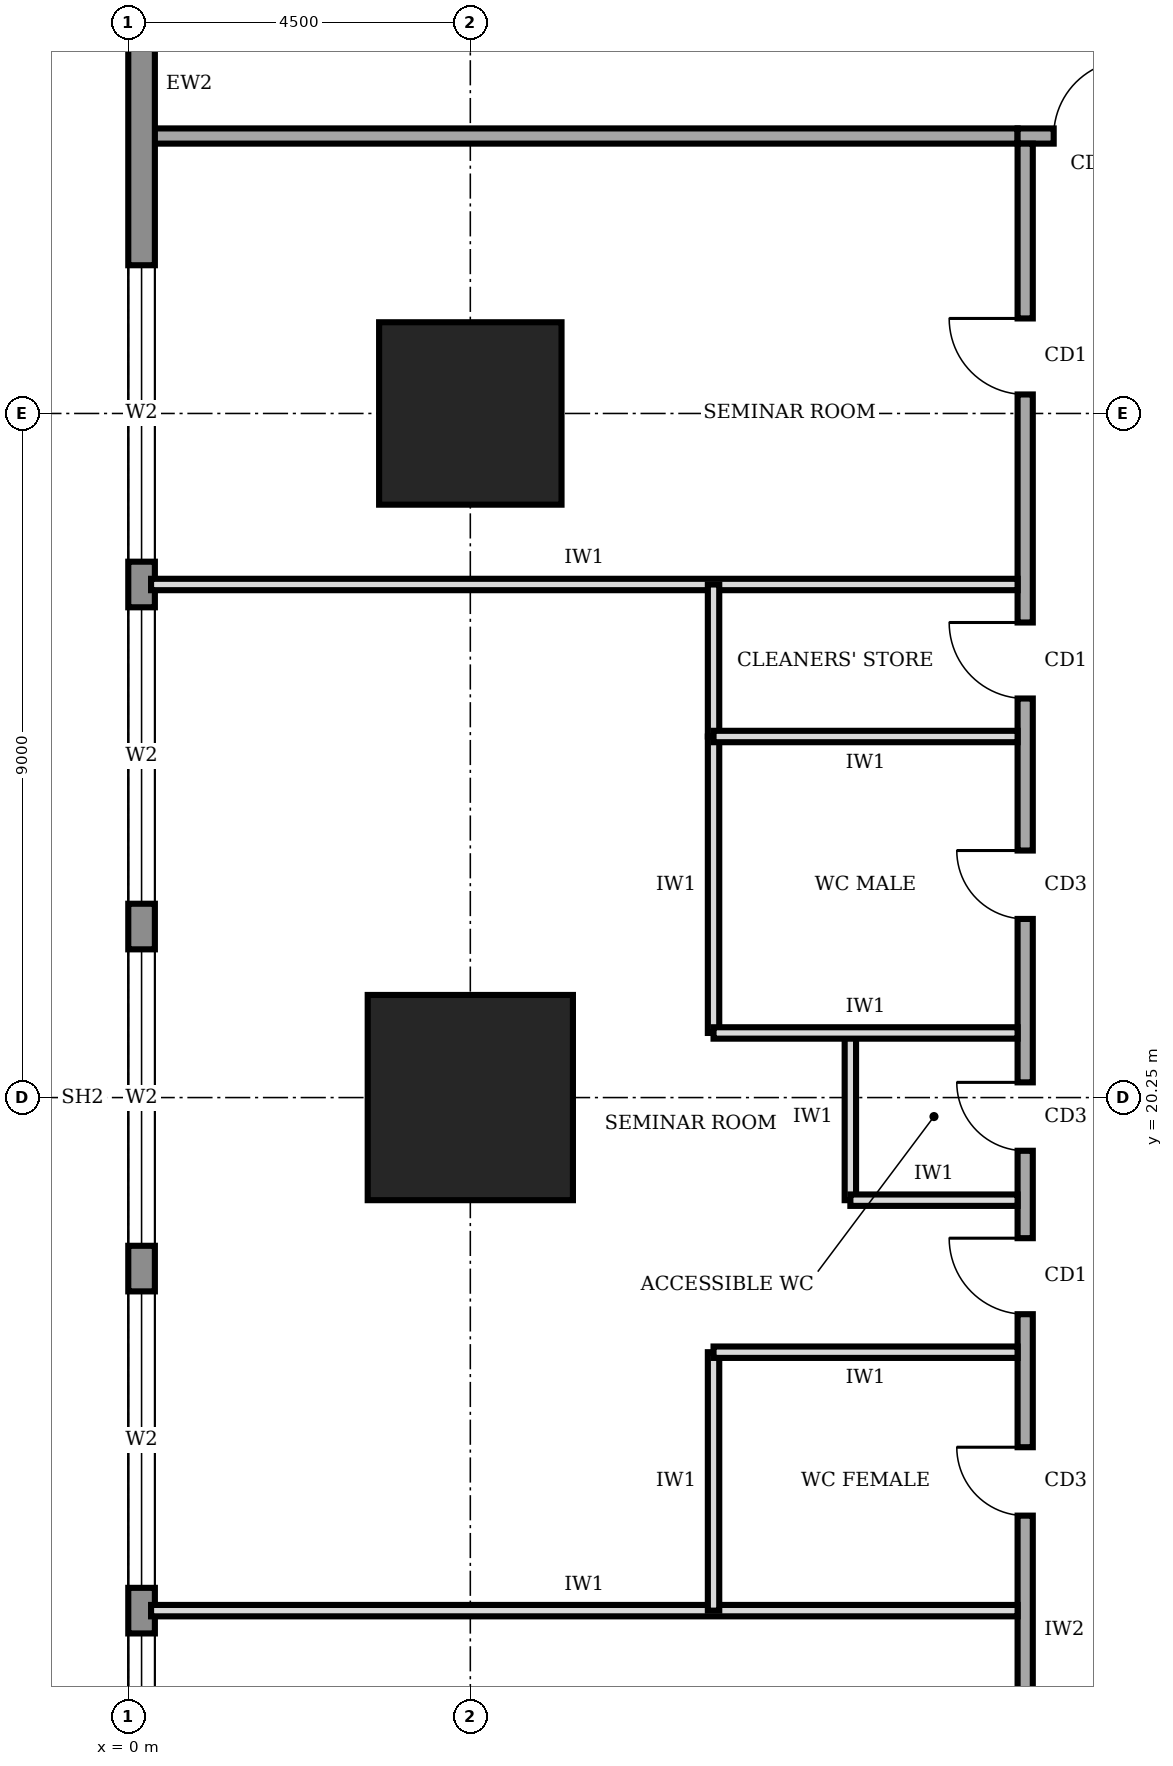
"""IFC4 building model, lengths in metres.
Left out: names, types, materials, properties, quantities, classifications, styles, units other than length and angle.
Written with IfcOpenShell. Run it as: python <this file> out.ifc"""

import sys

from ifc_helpers import new_model, si_unit, direction, frame, frame_2d, origin, origin_2d, place, context, subcontext, project, spatial, rectangle, extrude, element, fill, save


model = new_model("IFC4")
c1 = context("Model", 3, precision=1e-05, world=origin(), true_north=direction((0.0, 1.0)))
c2 = subcontext(c1, "Body", "Model", "MODEL_VIEW")
j1 = project(units=[si_unit("LENGTHUNIT", "METRE"), si_unit("PLANEANGLEUNIT", "RADIAN")], contexts=[c1])
p1 = place(None, origin())
s1 = spatial("IfcSite", under=j1, at=p1, CompositionType="ELEMENT")
p2 = place(p1, origin())
s2 = spatial("IfcBuilding", under=s1, at=p2, CompositionType="ELEMENT")
p3 = place(p2, frame((0.0, 0.0, 53.0)))
s3 = spatial("IfcBuildingStorey", under=s2, at=p3, CompositionType="ELEMENT", Elevation=53.0)
p4 = place(p3, frame((4.5, 20.25, 0.0), z_axis=(0.0, 0.0, 1.0), x_axis=(1.0, 0.0, 0.0)))
e1 = element("IfcColumn", 1, at=p4, inside=s3, PredefinedType="COLUMN", context=c2, shape_type="SweptSolid", body=[
    extrude(rectangle(XDim=2.7, YDim=2.7, at=origin_2d()), origin(), (0.0, 0.0, 1.0), 4.0),
])
p5 = place(p3, frame((4.5, 29.25, 0.0), z_axis=(0.0, 0.0, 1.0), x_axis=(1.0, 0.0, 0.0)))
e2 = element("IfcColumn", 2, at=p5, inside=s3, PredefinedType="COLUMN", context=c2, shape_type="SweptSolid", body=[
    extrude(rectangle(XDim=2.4, YDim=2.4, at=origin_2d()), origin(), (0.0, 0.0, 1.0), 4.0),
])
p6 = place(p3, frame((0.175, 35.98, 0.0), z_axis=(0.0, 0.0, 1.0), x_axis=(0.0, -1.0, 0.0)))
e3 = element("IfcWall", 3, at=p6, inside=s3, PredefinedType="STANDARD", context=c2, shape_type="SweptSolid", body=[
    extrude(rectangle(XDim=31.46, YDim=0.35, at=frame_2d((15.73, 0.0))), origin(), (0.0, 0.0, 1.0), 3.75),
])
p7 = place(p6, frame((27.21, 0.0, 0.6)))
e4 = element("IfcOpeningElement", 4, at=p7, cuts=e3, PredefinedType="OPENING", context=c2, shape_type="SweptSolid", body=[
    extrude(rectangle(XDim=3.9, YDim=2.6, at=frame_2d((1.95, 1.3))), frame((0.0, 0.185, 0.0), z_axis=(0.0, -1.0, 0.0), x_axis=(1.0, 0.0, 0.0)), (0.0, 0.0, 1.0), 0.37),
])
p8 = place(p6, frame((22.78, 0.0, 0.6)))
e5 = element("IfcOpeningElement", 5, at=p8, cuts=e3, PredefinedType="OPENING", context=c2, shape_type="SweptSolid", body=[
    extrude(rectangle(XDim=3.9, YDim=2.6, at=frame_2d((1.95, 1.3))), frame((0.0, 0.185, 0.0), z_axis=(0.0, -1.0, 0.0), x_axis=(1.0, 0.0, 0.0)), (0.0, 0.0, 1.0), 0.37),
])
p9 = place(p6, frame((18.28, 0.0, 0.6)))
e6 = element("IfcOpeningElement", 6, at=p9, cuts=e3, PredefinedType="OPENING", context=c2, shape_type="SweptSolid", body=[
    extrude(rectangle(XDim=3.9, YDim=2.6, at=frame_2d((1.95, 1.3))), frame((0.0, 0.185, 0.0), z_axis=(0.0, -1.0, 0.0), x_axis=(1.0, 0.0, 0.0)), (0.0, 0.0, 1.0), 0.37),
])
p10 = place(p6, frame((13.78, 0.0, 0.6)))
e7 = element("IfcOpeningElement", 7, at=p10, cuts=e3, PredefinedType="OPENING", context=c2, shape_type="SweptSolid", body=[
    extrude(rectangle(XDim=3.9, YDim=2.6, at=frame_2d((1.95, 1.3))), frame((0.0, 0.185, 0.0), z_axis=(0.0, -1.0, 0.0), x_axis=(1.0, 0.0, 0.0)), (0.0, 0.0, 1.0), 0.37),
])
p11 = place(p6, frame((9.28, 0.0, 0.6)))
e8 = element("IfcOpeningElement", 8, at=p11, cuts=e3, PredefinedType="OPENING", context=c2, shape_type="SweptSolid", body=[
    extrude(rectangle(XDim=3.9, YDim=2.6, at=frame_2d((1.95, 1.3))), frame((0.0, 0.185, 0.0), z_axis=(0.0, -1.0, 0.0), x_axis=(1.0, 0.0, 0.0)), (0.0, 0.0, 1.0), 0.37),
])
p12 = place(p6, frame((4.78, 0.0, 0.6)))
e9 = element("IfcOpeningElement", 9, at=p12, cuts=e3, PredefinedType="OPENING", context=c2, shape_type="SweptSolid", body=[
    extrude(rectangle(XDim=3.9, YDim=2.6, at=frame_2d((1.95, 1.3))), frame((0.0, 0.185, 0.0), z_axis=(0.0, -1.0, 0.0), x_axis=(1.0, 0.0, 0.0)), (0.0, 0.0, 1.0), 0.37),
])
p13 = place(p3, frame((28.6, 32.9, 0.0), z_axis=(0.0, 0.0, 1.0), x_axis=(-1.0, 0.0, 0.0)))
e10 = element("IfcWall", 10, at=p13, inside=s3, PredefinedType="SOLIDWALL", context=c2, shape_type="SweptSolid", body=[
    extrude(rectangle(XDim=16.9, YDim=0.2, at=frame_2d((8.45, 0.0))), origin(), (0.0, 0.0, 1.0), 3.75),
])
p14 = place(p13, frame((15.425, 0.0, 0.0)))
e11 = element("IfcOpeningElement", 11, at=p14, cuts=e10, PredefinedType="OPENING", context=c2, shape_type="SweptSolid", body=[
    extrude(rectangle(XDim=1.0, YDim=2.1, at=frame_2d((0.5, 1.05))), frame((0.0, 0.11, 0.0), z_axis=(0.0, -1.0, 0.0), x_axis=(1.0, 0.0, 0.0)), (0.0, 0.0, 1.0), 0.22),
])
p15 = place(p13, frame((12.35, 0.0, 0.0)))
e12 = element("IfcOpeningElement", 12, at=p15, cuts=e10, PredefinedType="OPENING", context=c2, shape_type="SweptSolid", body=[
    extrude(rectangle(XDim=1.0, YDim=2.1, at=frame_2d((0.5, 1.05))), frame((0.0, 0.11, 0.0), z_axis=(0.0, -1.0, 0.0), x_axis=(1.0, 0.0, 0.0)), (0.0, 0.0, 1.0), 0.22),
])
p16 = place(p13, frame((5.6, 0.0, 0.0)))
e13 = element("IfcOpeningElement", 13, at=p16, cuts=e10, PredefinedType="OPENING", context=c2, shape_type="SweptSolid", body=[
    extrude(rectangle(XDim=1.0, YDim=2.1, at=frame_2d((0.5, 1.05))), frame((0.0, 0.11, 0.0), z_axis=(0.0, -1.0, 0.0), x_axis=(1.0, 0.0, 0.0)), (0.0, 0.0, 1.0), 0.22),
])
p17 = place(p13, frame((0.275, 0.0, 0.0)))
e14 = element("IfcOpeningElement", 14, at=p17, cuts=e10, PredefinedType="OPENING", context=c2, shape_type="SweptSolid", body=[
    extrude(rectangle(XDim=1.0, YDim=2.1, at=frame_2d((0.5, 1.05))), frame((0.0, 0.11, 0.0), z_axis=(0.0, -1.0, 0.0), x_axis=(1.0, 0.0, 0.0)), (0.0, 0.0, 1.0), 0.22),
])
p18 = place(p3, frame((11.8, 32.8, 0.0), z_axis=(0.0, 0.0, 1.0), x_axis=(0.0, -1.0, 0.0)))
e15 = element("IfcWall", 15, at=p18, inside=s3, PredefinedType="SOLIDWALL", context=c2, shape_type="SweptSolid", body=[
    extrude(rectangle(XDim=23.8, YDim=0.2, at=frame_2d((11.9, 0.0))), origin(), (0.0, 0.0, 1.0), 3.75),
])
p19 = place(p18, frame((21.05, 0.0, 0.0)))
e16 = element("IfcOpeningElement", 16, at=p19, cuts=e15, PredefinedType="OPENING", context=c2, shape_type="SweptSolid", body=[
    extrude(rectangle(XDim=1.0, YDim=2.1, at=frame_2d((0.5, 1.05))), frame((0.0, 0.11, 0.0), z_axis=(0.0, -1.0, 0.0), x_axis=(1.0, 0.0, 0.0)), (0.0, 0.0, 1.0), 0.22),
])
p20 = place(p18, frame((17.15, 0.0, 0.0)))
e17 = element("IfcOpeningElement", 17, at=p20, cuts=e15, PredefinedType="OPENING", context=c2, shape_type="SweptSolid", body=[
    extrude(rectangle(XDim=0.9, YDim=2.1, at=frame_2d((0.45, 1.05))), frame((0.0, 0.11, 0.0), z_axis=(0.0, -1.0, 0.0), x_axis=(1.0, 0.0, 0.0)), (0.0, 0.0, 1.0), 0.22),
])
p21 = place(p18, frame((12.35, 0.0, 0.0)))
e18 = element("IfcOpeningElement", 18, at=p21, cuts=e15, PredefinedType="OPENING", context=c2, shape_type="SweptSolid", body=[
    extrude(rectangle(XDim=0.9, YDim=2.1, at=frame_2d((0.45, 1.05))), frame((0.0, 0.11, 0.0), z_axis=(0.0, -1.0, 0.0), x_axis=(1.0, 0.0, 0.0)), (0.0, 0.0, 1.0), 0.22),
])
p22 = place(p18, frame((9.3, 0.0, 0.0)))
e19 = element("IfcOpeningElement", 19, at=p22, cuts=e15, PredefinedType="OPENING", context=c2, shape_type="SweptSolid", body=[
    extrude(rectangle(XDim=0.9, YDim=2.1, at=frame_2d((0.45, 1.05))), frame((0.0, 0.11, 0.0), z_axis=(0.0, -1.0, 0.0), x_axis=(1.0, 0.0, 0.0)), (0.0, 0.0, 1.0), 0.22),
])
p23 = place(p18, frame((6.3, 0.0, 0.0)))
e20 = element("IfcOpeningElement", 20, at=p23, cuts=e15, PredefinedType="OPENING", context=c2, shape_type="SweptSolid", body=[
    extrude(rectangle(XDim=1.0, YDim=2.1, at=frame_2d((0.5, 1.05))), frame((0.0, 0.11, 0.0), z_axis=(0.0, -1.0, 0.0), x_axis=(1.0, 0.0, 0.0)), (0.0, 0.0, 1.0), 0.22),
])
p24 = place(p18, frame((14.4, 0.0, 0.0)))
e21 = element("IfcOpeningElement", 21, at=p24, cuts=e15, PredefinedType="OPENING", context=c2, shape_type="SweptSolid", body=[
    extrude(rectangle(XDim=1.0, YDim=2.1, at=frame_2d((0.5, 1.05))), frame((0.0, 0.11, 0.0), z_axis=(0.0, -1.0, 0.0), x_axis=(1.0, 0.0, 0.0)), (0.0, 0.0, 1.0), 0.22),
])
p25 = place(p18, frame((2.3, 0.0, 0.0)))
e22 = element("IfcOpeningElement", 22, at=p25, cuts=e15, PredefinedType="OPENING", context=c2, shape_type="SweptSolid", body=[
    extrude(rectangle(XDim=1.0, YDim=2.1, at=frame_2d((0.5, 1.05))), frame((0.0, 0.11, 0.0), z_axis=(0.0, -1.0, 0.0), x_axis=(1.0, 0.0, 0.0)), (0.0, 0.0, 1.0), 0.22),
])
p26 = place(p3, frame((0.3, 32.9, 0.0), z_axis=(0.0, 0.0, 1.0), x_axis=(1.0, 0.0, 0.0)))
e23 = element("IfcWall", 23, at=p26, inside=s3, PredefinedType="SOLIDWALL", context=c2, shape_type="SweptSolid", body=[
    extrude(rectangle(XDim=11.4, YDim=0.2, at=frame_2d((5.7, 0.0))), origin(), (0.0, 0.0, 1.0), 3.75),
])
for number, where, z_axis, x_axis in (
    (24, (0.3, 13.5, 0.0), (0.0, 0.0, 1.0), (1.0, 0.0, 0.0)),
    (25, (0.3, 27.0, 0.0), (0.0, 0.0, 1.0), (1.0, 0.0, 0.0)),
):
    element("IfcWall", number, at=place(p3, frame(where, z_axis=z_axis, x_axis=x_axis)), inside=s3, PredefinedType="PARTITIONING", context=c2, shape_type="SweptSolid", body=[
        extrude(rectangle(XDim=11.4, YDim=0.15, at=frame_2d((5.7, 0.0))), origin(), (0.0, 0.0, 1.0), 3.75),
    ])
p27 = place(p3, frame((11.7, 16.9, 0.0), z_axis=(0.0, 0.0, 1.0), x_axis=(-1.0, 0.0, 0.0)))
e26 = element("IfcWall", 26, at=p27, inside=s3, PredefinedType="PARTITIONING", context=c2, shape_type="SweptSolid", body=[
    extrude(rectangle(XDim=4.0, YDim=0.15, at=frame_2d((2.0, 0.0))), origin(), (0.0, 0.0, 1.0), 3.75),
])
p28 = place(p3, frame((11.7, 18.9, 0.0), z_axis=(0.0, 0.0, 1.0), x_axis=(-1.0, 0.0, 0.0)))
e27 = element("IfcWall", 27, at=p28, inside=s3, PredefinedType="PARTITIONING", context=c2, shape_type="SweptSolid", body=[
    extrude(rectangle(XDim=2.2, YDim=0.15, at=frame_2d((1.1, 0.0))), origin(), (0.0, 0.0, 1.0), 3.75),
])
p29 = place(p3, frame((11.7, 21.1, 0.0), z_axis=(0.0, 0.0, 1.0), x_axis=(-1.0, 0.0, 0.0)))
e28 = element("IfcWall", 28, at=p29, inside=s3, PredefinedType="PARTITIONING", context=c2, shape_type="SweptSolid", body=[
    extrude(rectangle(XDim=4.0, YDim=0.15, at=frame_2d((2.0, 0.0))), origin(), (0.0, 0.0, 1.0), 2.85),
])
p30 = place(p3, frame((11.7, 25.0, 0.0), z_axis=(0.0, 0.0, 1.0), x_axis=(-1.0, 0.0, 0.0)))
e29 = element("IfcWall", 29, at=p30, inside=s3, PredefinedType="PARTITIONING", context=c2, shape_type="SweptSolid", body=[
    extrude(rectangle(XDim=4.0, YDim=0.15, at=frame_2d((2.0, 0.0))), origin(), (0.0, 0.0, 1.0), 3.75),
])
p31 = place(p3, frame((7.7, 13.5, 0.0), z_axis=(0.0, 0.0, 1.0), x_axis=(0.0, 1.0, 0.0)))
e30 = element("IfcWall", 30, at=p31, inside=s3, PredefinedType="PARTITIONING", context=c2, shape_type="SweptSolid", body=[
    extrude(rectangle(XDim=3.4, YDim=0.15, at=frame_2d((1.7, 0.0))), origin(), (0.0, 0.0, 1.0), 3.75),
])
p32 = place(p3, frame((9.5, 18.9, 0.0), z_axis=(0.0, 0.0, 1.0), x_axis=(0.0, 1.0, 0.0)))
e31 = element("IfcWall", 31, at=p32, inside=s3, PredefinedType="PARTITIONING", context=c2, shape_type="SweptSolid", body=[
    extrude(rectangle(XDim=2.2, YDim=0.15, at=frame_2d((1.1, 0.0))), origin(), (0.0, 0.0, 1.0), 3.75),
])
p33 = place(p3, frame((7.7, 21.1, 0.0), z_axis=(0.0, 0.0, 1.0), x_axis=(0.0, 1.0, 0.0)))
e32 = element("IfcWall", 32, at=p33, inside=s3, PredefinedType="PARTITIONING", context=c2, shape_type="SweptSolid", body=[
    extrude(rectangle(XDim=3.9, YDim=0.15, at=frame_2d((1.95, 0.0))), origin(), (0.0, 0.0, 1.0), 3.75),
])
p34 = place(p3, frame((7.7, 25.0, 0.0), z_axis=(0.0, 0.0, 1.0), x_axis=(0.0, 1.0, 0.0)))
e33 = element("IfcWall", 33, at=p34, inside=s3, PredefinedType="PARTITIONING", context=c2, shape_type="SweptSolid", body=[
    extrude(rectangle(XDim=2.0, YDim=0.15, at=frame_2d((1.0, 0.0))), origin(), (0.0, 0.0, 1.0), 3.75),
])
p35 = place(p8, origin())
e34 = element("IfcWindow", 34, at=p35, inside=s3, PartitioningType="SINGLE_PANEL", PredefinedType="WINDOW", context=c2, shape_type="SweptSolid", body=[
    extrude(rectangle(XDim=3.9, YDim=2.6, at=frame_2d((1.95, 1.3))), frame((0.0, 0.03, 0.0), z_axis=(0.0, -1.0, 0.0), x_axis=(1.0, 0.0, 0.0)), (0.0, 0.0, 1.0), 0.06),
])
fill(e5, e34)
p36 = place(p9, origin())
e35 = element("IfcWindow", 35, at=p36, inside=s3, PartitioningType="SINGLE_PANEL", PredefinedType="WINDOW", context=c2, shape_type="SweptSolid", body=[
    extrude(rectangle(XDim=3.9, YDim=2.6, at=frame_2d((1.95, 1.3))), frame((0.0, 0.03, 0.0), z_axis=(0.0, -1.0, 0.0), x_axis=(1.0, 0.0, 0.0)), (0.0, 0.0, 1.0), 0.06),
])
fill(e6, e35)
p37 = place(p10, origin())
e36 = element("IfcWindow", 36, at=p37, inside=s3, PartitioningType="SINGLE_PANEL", PredefinedType="WINDOW", context=c2, shape_type="SweptSolid", body=[
    extrude(rectangle(XDim=3.9, YDim=2.6, at=frame_2d((1.95, 1.3))), frame((0.0, 0.03, 0.0), z_axis=(0.0, -1.0, 0.0), x_axis=(1.0, 0.0, 0.0)), (0.0, 0.0, 1.0), 0.06),
])
fill(e7, e36)
p38 = place(p11, origin())
e37 = element("IfcWindow", 37, at=p38, inside=s3, PartitioningType="SINGLE_PANEL", PredefinedType="WINDOW", context=c2, shape_type="SweptSolid", body=[
    extrude(rectangle(XDim=3.9, YDim=2.6, at=frame_2d((1.95, 1.3))), frame((0.0, 0.03, 0.0), z_axis=(0.0, -1.0, 0.0), x_axis=(1.0, 0.0, 0.0)), (0.0, 0.0, 1.0), 0.06),
])
fill(e8, e37)
p39 = place(p12, origin())
e38 = element("IfcWindow", 38, at=p39, inside=s3, PartitioningType="SINGLE_PANEL", PredefinedType="WINDOW", context=c2, shape_type="SweptSolid", body=[
    extrude(rectangle(XDim=3.9, YDim=2.6, at=frame_2d((1.95, 1.3))), frame((0.0, 0.03, 0.0), z_axis=(0.0, -1.0, 0.0), x_axis=(1.0, 0.0, 0.0)), (0.0, 0.0, 1.0), 0.06),
])
fill(e9, e38)
p40 = place(p14, frame((1.0, 0.0, 0.0), z_axis=(0.0, 0.0, 1.0), x_axis=(-1.0, 0.0, 0.0)))
e39 = element("IfcDoor", 39, at=p40, inside=s3, OperationType="SINGLE_SWING_RIGHT", PredefinedType="DOOR", context=c2, shape_type="SweptSolid", body=[
    extrude(rectangle(XDim=1.0, YDim=2.1, at=frame_2d((0.5, 1.05))), frame((0.0, 0.025, 0.0), z_axis=(0.0, -1.0, 0.0), x_axis=(1.0, 0.0, 0.0)), (0.0, 0.0, 1.0), 0.05),
])
fill(e11, e39)
p41 = place(p20, frame((0.9, 0.0, 0.0), z_axis=(0.0, 0.0, 1.0), x_axis=(-1.0, 0.0, 0.0)))
e40 = element("IfcDoor", 40, at=p41, inside=s3, OperationType="SINGLE_SWING_RIGHT", PredefinedType="DOOR", context=c2, shape_type="SweptSolid", body=[
    extrude(rectangle(XDim=0.9, YDim=2.1, at=frame_2d((0.45, 1.05))), frame((0.0, 0.025, 0.0), z_axis=(0.0, -1.0, 0.0), x_axis=(1.0, 0.0, 0.0)), (0.0, 0.0, 1.0), 0.05),
])
fill(e17, e40)
p42 = place(p21, frame((0.9, 0.0, 0.0), z_axis=(0.0, 0.0, 1.0), x_axis=(-1.0, 0.0, 0.0)))
e41 = element("IfcDoor", 41, at=p42, inside=s3, OperationType="SINGLE_SWING_RIGHT", PredefinedType="DOOR", context=c2, shape_type="SweptSolid", body=[
    extrude(rectangle(XDim=0.9, YDim=2.1, at=frame_2d((0.45, 1.05))), frame((0.0, 0.025, 0.0), z_axis=(0.0, -1.0, 0.0), x_axis=(1.0, 0.0, 0.0)), (0.0, 0.0, 1.0), 0.05),
])
fill(e18, e41)
p43 = place(p22, frame((0.9, 0.0, 0.0), z_axis=(0.0, 0.0, 1.0), x_axis=(-1.0, 0.0, 0.0)))
e42 = element("IfcDoor", 42, at=p43, inside=s3, OperationType="SINGLE_SWING_RIGHT", PredefinedType="DOOR", context=c2, shape_type="SweptSolid", body=[
    extrude(rectangle(XDim=0.9, YDim=2.1, at=frame_2d((0.45, 1.05))), frame((0.0, 0.025, 0.0), z_axis=(0.0, -1.0, 0.0), x_axis=(1.0, 0.0, 0.0)), (0.0, 0.0, 1.0), 0.05),
])
fill(e19, e42)
p44 = place(p23, frame((1.0, 0.0, 0.0), z_axis=(0.0, 0.0, 1.0), x_axis=(-1.0, 0.0, 0.0)))
e43 = element("IfcDoor", 43, at=p44, inside=s3, OperationType="SINGLE_SWING_RIGHT", PredefinedType="DOOR", context=c2, shape_type="SweptSolid", body=[
    extrude(rectangle(XDim=1.0, YDim=2.1, at=frame_2d((0.5, 1.05))), frame((0.0, 0.025, 0.0), z_axis=(0.0, -1.0, 0.0), x_axis=(1.0, 0.0, 0.0)), (0.0, 0.0, 1.0), 0.05),
])
fill(e20, e43)
p45 = place(p24, frame((1.0, 0.0, 0.0), z_axis=(0.0, 0.0, 1.0), x_axis=(-1.0, 0.0, 0.0)))
e44 = element("IfcDoor", 44, at=p45, inside=s3, OperationType="SINGLE_SWING_RIGHT", PredefinedType="DOOR", context=c2, shape_type="SweptSolid", body=[
    extrude(rectangle(XDim=1.0, YDim=2.1, at=frame_2d((0.5, 1.05))), frame((0.0, 0.025, 0.0), z_axis=(0.0, -1.0, 0.0), x_axis=(1.0, 0.0, 0.0)), (0.0, 0.0, 1.0), 0.05),
])
fill(e21, e44)
p46 = place(p25, frame((1.0, 0.0, 0.0), z_axis=(0.0, 0.0, 1.0), x_axis=(-1.0, 0.0, 0.0)))
e45 = element("IfcDoor", 45, at=p46, inside=s3, OperationType="SINGLE_SWING_RIGHT", PredefinedType="DOOR", context=c2, shape_type="SweptSolid", body=[
    extrude(rectangle(XDim=1.0, YDim=2.1, at=frame_2d((0.5, 1.05))), frame((0.0, 0.025, 0.0), z_axis=(0.0, -1.0, 0.0), x_axis=(1.0, 0.0, 0.0)), (0.0, 0.0, 1.0), 0.05),
])
fill(e22, e45)
save(model, sys.argv[1])
